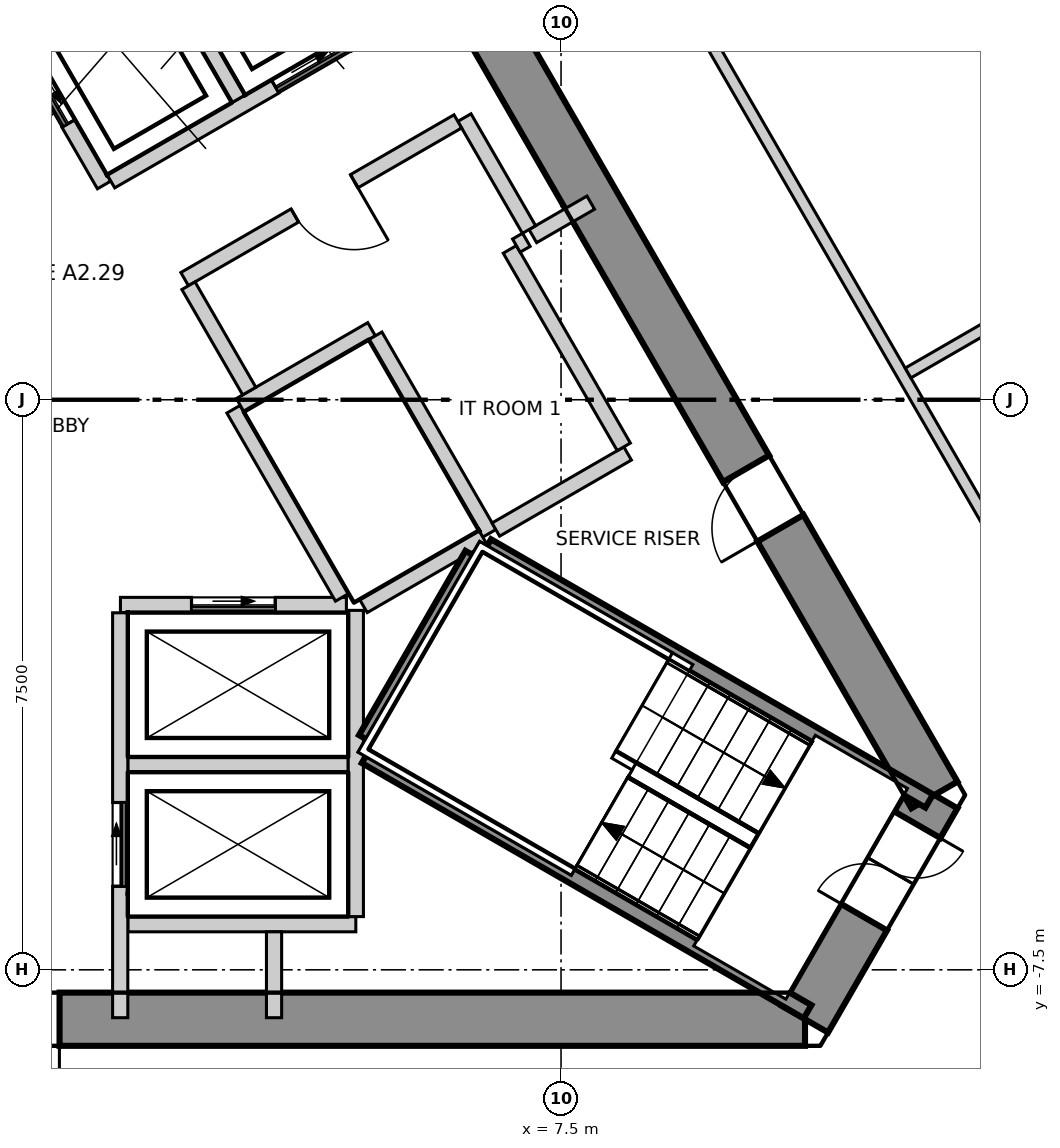
"""IFC4 building model, lengths in metres.
Left out: names, types, materials, properties, quantities, classifications, styles, units other than length and angle.
Written with IfcOpenShell. Run it as: python <this file> out.ifc"""

import sys

from ifc_helpers import new_model, si_unit, direction, frame, frame_2d, origin, place, context, subcontext, project, spatial, polyline, rectangle, outline, extrude, element, fill, save


model = new_model("IFC4")
c1 = context("Model", 3, precision=1e-05, world=origin(), true_north=direction((0.0, 1.0)))
c2 = subcontext(c1, "Body", "Model", "MODEL_VIEW")
j1 = project(units=[si_unit("LENGTHUNIT", "METRE"), si_unit("PLANEANGLEUNIT", "RADIAN")], contexts=[c1])
p1 = place(None, origin())
s1 = spatial("IfcSite", under=j1, at=p1, CompositionType="ELEMENT")
p2 = place(p1, origin())
s2 = spatial("IfcBuilding", under=s1, at=p2, CompositionType="ELEMENT")
p3 = place(p2, frame((0.0, 0.0, 251.3)))
s3 = spatial("IfcBuildingStorey", under=s2, at=p3, CompositionType="ELEMENT", Elevation=251.3)
p4 = place(p3, frame((-10.71, -8.15, -0.3), z_axis=(0.0, 0.0, 1.0), x_axis=(1.0, 0.0, 0.0)))
e1 = element("IfcWall", 1, at=p4, inside=s3, PredefinedType="SHEAR", context=c2, shape_type="SweptSolid", body=[
    extrude(outline(polyline([(-0.202, -0.35), (1.782, -0.35), (3.766, -0.35), (5.75, -0.35), (7.734, -0.35), (9.718, -0.35), (11.702, -0.35), (13.686, -0.35), (15.67, -0.35), (17.654, -0.35), (19.638, -0.35), (21.622, -0.35), (21.218, 0.35), (19.307, 0.35), (17.397, 0.35), (15.486, 0.35), (13.576, 0.35), (11.665, 0.35), (9.755, 0.35), (7.844, 0.35), (5.934, 0.35), (4.023, 0.35), (2.113, 0.35), (0.202, 0.35), (-0.202, -0.35)])), origin(), (0.0, 0.0, 1.0), 4.2),
])
p5 = place(p4, frame((9.81, 0.0, 0.3)))
e2 = element("IfcOpeningElement", 2, at=p5, cuts=e1, PredefinedType="OPENING", context=c2, shape_type="SweptSolid", body=[
    extrude(rectangle(XDim=1.8, YDim=2.1, at=frame_2d((0.9, 1.05))), frame((0.0, 0.36, 0.0), z_axis=(0.0, -1.0, 0.0), x_axis=(1.0, 0.0, 0.0)), (0.0, 0.0, 1.0), 0.72),
])
p6 = place(p4, frame((4.12, 0.0, 0.3)))
e3 = element("IfcOpeningElement", 3, at=p6, cuts=e1, PredefinedType="OPENING", context=c2, shape_type="SweptSolid", body=[
    extrude(rectangle(XDim=0.9, YDim=2.1, at=frame_2d((0.45, 1.05))), frame((0.0, 0.36, 0.0), z_axis=(0.0, -1.0, 0.0), x_axis=(1.0, 0.0, 0.0)), (0.0, 0.0, 1.0), 0.72),
])
p7 = place(p3, frame((10.71, -8.15, -0.3), z_axis=(0.0, 0.0, 1.0), x_axis=(0.49999337185, 0.866029230515, 0.0)))
e4 = element("IfcWall", 4, at=p7, inside=s3, PredefinedType="SHEAR", context=c2, shape_type="SweptSolid", body=[
    extrude(outline(polyline([(-0.202, -0.35), (1.703, -0.35), (3.608, -0.35), (3.204, 0.35), (1.703, 0.35), (0.202, 0.35), (-0.202, -0.35)])), origin(), (0.0, 0.0, 1.0), 4.2),
])
p8 = place(p7, frame((1.553, 0.0, 0.3)))
e5 = element("IfcOpeningElement", 5, at=p8, cuts=e4, PredefinedType="OPENING", context=c2, shape_type="SweptSolid", body=[
    extrude(rectangle(XDim=1.4, YDim=2.1, at=frame_2d((0.7, 1.05))), frame((0.0, 0.36, 0.0), z_axis=(0.0, -1.0, 0.0), x_axis=(1.0, 0.0, 0.0)), (0.0, 0.0, 1.0), 0.72),
])
p9 = place(p3, frame((12.413, -5.2, -0.3), z_axis=(0.0, 0.0, 1.0), x_axis=(-0.500011533395, 0.866018744874, 0.0)))
e6 = element("IfcWall", 6, at=p9, inside=s3, PredefinedType="SHEAR", context=c2, shape_type="SweptSolid", body=[
    extrude(outline(polyline([(-0.202, -0.35), (1.782, -0.35), (3.766, -0.35), (5.75, -0.35), (7.734, -0.35), (9.718, -0.35), (11.702, -0.35), (13.686, -0.35), (15.67, -0.35), (17.654, -0.35), (19.638, -0.35), (21.622, -0.35), (21.218, 0.35), (19.307, 0.35), (17.397, 0.35), (15.486, 0.35), (13.576, 0.35), (11.665, 0.35), (9.755, 0.35), (7.844, 0.35), (5.934, 0.35), (4.023, 0.35), (2.113, 0.35), (0.202, 0.35), (-0.202, -0.35)])), origin(), (0.0, 0.0, 1.0), 4.2),
])
p10 = place(p9, frame((4.055, 0.0, 0.3)))
e7 = element("IfcOpeningElement", 7, at=p10, cuts=e6, PredefinedType="OPENING", context=c2, shape_type="SweptSolid", body=[
    extrude(rectangle(XDim=0.9, YDim=2.1, at=frame_2d((0.45, 1.05))), frame((0.0, 0.36, 0.0), z_axis=(0.0, -1.0, 0.0), x_axis=(1.0, 0.0, 0.0)), (0.0, 0.0, 1.0), 0.72),
])
p11 = place(p9, frame((16.465, 0.0, 0.3)))
e8 = element("IfcOpeningElement", 8, at=p11, cuts=e6, PredefinedType="OPENING", context=c2, shape_type="SweptSolid", body=[
    extrude(rectangle(XDim=0.9, YDim=2.1, at=frame_2d((0.45, 1.05))), frame((0.0, 0.36, 0.0), z_axis=(0.0, -1.0, 0.0), x_axis=(1.0, 0.0, 0.0)), (0.0, 0.0, 1.0), 0.72),
])
p12 = place(p3, frame((26.859, -12.457, 0.0), z_axis=(0.0, 0.0, 1.0), x_axis=(-0.500004868955, 0.866022592674, 0.0)))
e9 = element("IfcWall", 9, at=p12, inside=s3, PredefinedType="ELEMENTEDWALL", context=c2, shape_type="SweptSolid", body=[
    extrude(rectangle(XDim=48.416, YDim=0.2, at=frame_2d((24.208, 0.0))), origin(), (0.0, 0.0, 1.0), 3.9),
])
p13 = place(p12, frame((2.067, 0.0, 0.9)))
e10 = element("IfcOpeningElement", 10, at=p13, cuts=e9, PredefinedType="OPENING", context=c2, shape_type="SweptSolid", body=[
    extrude(rectangle(XDim=4.2, YDim=2.5, at=frame_2d((2.1, 1.25))), frame((0.0, 0.11, 0.0), z_axis=(0.0, -1.0, 0.0), x_axis=(1.0, 0.0, 0.0)), (0.0, 0.0, 1.0), 0.22),
])
p14 = place(p12, frame((7.796, 0.0, 0.9)))
e11 = element("IfcOpeningElement", 11, at=p14, cuts=e9, PredefinedType="OPENING", context=c2, shape_type="SweptSolid", body=[
    extrude(rectangle(XDim=4.2, YDim=2.5, at=frame_2d((2.1, 1.25))), frame((0.0, 0.11, 0.0), z_axis=(0.0, -1.0, 0.0), x_axis=(1.0, 0.0, 0.0)), (0.0, 0.0, 1.0), 0.22),
])
p15 = place(p12, frame((13.525, 0.0, 0.9)))
e12 = element("IfcOpeningElement", 12, at=p15, cuts=e9, PredefinedType="OPENING", context=c2, shape_type="SweptSolid", body=[
    extrude(rectangle(XDim=4.2, YDim=2.5, at=frame_2d((2.1, 1.25))), frame((0.0, 0.11, 0.0), z_axis=(0.0, -1.0, 0.0), x_axis=(1.0, 0.0, 0.0)), (0.0, 0.0, 1.0), 0.22),
])
p16 = place(p12, frame((19.253, 0.0, 0.9)))
e13 = element("IfcOpeningElement", 13, at=p16, cuts=e9, PredefinedType="OPENING", context=c2, shape_type="SweptSolid", body=[
    extrude(rectangle(XDim=4.2, YDim=2.5, at=frame_2d((2.1, 1.25))), frame((0.0, 0.11, 0.0), z_axis=(0.0, -1.0, 0.0), x_axis=(1.0, 0.0, 0.0)), (0.0, 0.0, 1.0), 0.22),
])
p17 = place(p12, frame((24.982, 0.0, 0.9)))
e14 = element("IfcOpeningElement", 14, at=p17, cuts=e9, PredefinedType="OPENING", context=c2, shape_type="SweptSolid", body=[
    extrude(rectangle(XDim=4.2, YDim=2.5, at=frame_2d((2.1, 1.25))), frame((0.0, 0.11, 0.0), z_axis=(0.0, -1.0, 0.0), x_axis=(1.0, 0.0, 0.0)), (0.0, 0.0, 1.0), 0.22),
])
p18 = place(p12, frame((30.711, 0.0, 0.9)))
e15 = element("IfcOpeningElement", 15, at=p18, cuts=e9, PredefinedType="OPENING", context=c2, shape_type="SweptSolid", body=[
    extrude(rectangle(XDim=4.2, YDim=2.5, at=frame_2d((2.1, 1.25))), frame((0.0, 0.11, 0.0), z_axis=(0.0, -1.0, 0.0), x_axis=(1.0, 0.0, 0.0)), (0.0, 0.0, 1.0), 0.22),
])
p19 = place(p12, frame((36.44, 0.0, 0.9)))
e16 = element("IfcOpeningElement", 16, at=p19, cuts=e9, PredefinedType="OPENING", context=c2, shape_type="SweptSolid", body=[
    extrude(rectangle(XDim=4.2, YDim=2.5, at=frame_2d((2.1, 1.25))), frame((0.0, 0.11, 0.0), z_axis=(0.0, -1.0, 0.0), x_axis=(1.0, 0.0, 0.0)), (0.0, 0.0, 1.0), 0.22),
])
p20 = place(p12, frame((42.168, 0.0, 0.9)))
e17 = element("IfcOpeningElement", 17, at=p20, cuts=e9, PredefinedType="OPENING", context=c2, shape_type="SweptSolid", body=[
    extrude(rectangle(XDim=4.2, YDim=2.5, at=frame_2d((2.1, 1.25))), frame((0.0, 0.11, 0.0), z_axis=(0.0, -1.0, 0.0), x_axis=(1.0, 0.0, 0.0)), (0.0, 0.0, 1.0), 0.22),
])
p21 = place(p3, frame((3.132, 15.675, 0.0), z_axis=(0.0, 0.0, 1.0), x_axis=(0.499994246357, -0.866028725626, 0.0)))
e18 = element("IfcWall", 18, at=p21, inside=s3, PredefinedType="PARTITIONING", context=c2, shape_type="SweptSolid", body=[
    extrude(rectangle(XDim=24.104, YDim=0.15, at=frame_2d((12.052, 0.0))), origin(), (0.0, 0.0, 1.0), 3.9),
])
p22 = place(p21, frame((20.321, 0.0, 0.0)))
e19 = element("IfcOpeningElement", 19, at=p22, cuts=e18, PredefinedType="OPENING", context=c2, shape_type="SweptSolid", body=[
    extrude(rectangle(XDim=1.2, YDim=2.1, at=frame_2d((0.6, 1.05))), frame((0.0, 0.085, 0.0), z_axis=(0.0, -1.0, 0.0), x_axis=(1.0, 0.0, 0.0)), (0.0, 0.0, 1.0), 0.17),
])
p23 = place(p21, frame((11.508, 0.0, 0.0)))
e20 = element("IfcOpeningElement", 20, at=p23, cuts=e18, PredefinedType="OPENING", context=c2, shape_type="SweptSolid", body=[
    extrude(rectangle(XDim=1.0, YDim=2.1, at=frame_2d((0.5, 1.05))), frame((0.0, 0.085, 0.0), z_axis=(0.0, -1.0, 0.0), x_axis=(1.0, 0.0, 0.0)), (0.0, 0.0, 1.0), 0.17),
])
p24 = place(p21, frame((2.497, 0.0, 0.0)))
e21 = element("IfcOpeningElement", 21, at=p24, cuts=e18, PredefinedType="OPENING", context=c2, shape_type="SweptSolid", body=[
    extrude(rectangle(XDim=1.2, YDim=2.1, at=frame_2d((0.6, 1.05))), frame((0.0, 0.085, 0.0), z_axis=(0.0, -1.0, 0.0), x_axis=(1.0, 0.0, 0.0)), (0.0, 0.0, 1.0), 0.17),
])
p25 = place(p3, frame((12.066, 0.352, 0.0), z_axis=(0.0, 0.0, 1.0), x_axis=(0.866046605956, 0.499963274963, 0.0)))
e22 = element("IfcWall", 22, at=p25, inside=s3, PredefinedType="PARTITIONING", context=c2, shape_type="SweptSolid", body=[
    extrude(rectangle(XDim=6.406, YDim=0.15, at=frame_2d((3.203, 0.0))), origin(), (0.0, 0.0, 1.0), 3.9),
])
p26 = place(p3, frame((1.8, -4.8, 0.0), z_axis=(0.0, 0.0, 1.0), x_axis=(1.0, 0.0, 0.0)))
e23 = element("IfcWall", 23, at=p26, inside=s3, PredefinedType="SOLIDWALL", context=c2, shape_type="SweptSolid", body=[
    extrude(rectangle(XDim=2.9, YDim=0.2, at=frame_2d((1.45, 0.0))), origin(), (0.0, 0.0, 1.0), 3.9),
])
p27 = place(p3, frame((1.8, -6.9, 0.0), z_axis=(0.0, 0.0, 1.0), x_axis=(1.0, 0.0, 0.0)))
e24 = element("IfcWall", 24, at=p27, inside=s3, PredefinedType="SOLIDWALL", context=c2, shape_type="SweptSolid", body=[
    extrude(rectangle(XDim=3.0, YDim=0.2, at=frame_2d((1.5, 0.0))), origin(), (0.0, 0.0, 1.0), 3.9),
])
p28 = place(p3, frame((1.703, -2.7, 0.0), z_axis=(0.0, 0.0, 1.0), x_axis=(1.0, 0.0, 0.0)))
e25 = element("IfcWall", 25, at=p28, inside=s3, PredefinedType="SOLIDWALL", context=c2, shape_type="SweptSolid", body=[
    extrude(rectangle(XDim=2.973, YDim=0.2, at=frame_2d((1.487, 0.0))), origin(), (0.0, 0.0, 1.0), 3.9),
])
p29 = place(p28, frame((0.936, 0.0, 0.0)))
e26 = element("IfcOpeningElement", 26, at=p29, cuts=e25, PredefinedType="OPENING", context=c2, shape_type="SweptSolid", body=[
    extrude(rectangle(XDim=1.1, YDim=2.1, at=frame_2d((0.55, 1.05))), frame((0.0, 0.11, 0.0), z_axis=(0.0, -1.0, 0.0), x_axis=(1.0, 0.0, 0.0)), (0.0, 0.0, 1.0), 0.22),
])
p30 = place(p3, frame((0.0, 5.4, 0.0), z_axis=(0.0, 0.0, 1.0), x_axis=(0.500103862429, -0.865965430478, 0.0)))
e27 = element("IfcWall", 27, at=p30, inside=s3, PredefinedType="SOLIDWALL", context=c2, shape_type="SweptSolid", body=[
    extrude(rectangle(XDim=2.973, YDim=0.2, at=frame_2d((1.487, 0.0))), origin(), (0.0, 0.0, 1.0), 3.9),
])
p31 = place(p30, frame((0.937, 0.0, 0.0)))
e28 = element("IfcOpeningElement", 28, at=p31, cuts=e27, PredefinedType="OPENING", context=c2, shape_type="SweptSolid", body=[
    extrude(rectangle(XDim=1.1, YDim=2.1, at=frame_2d((0.55, 1.05))), frame((0.0, 0.11, 0.0), z_axis=(0.0, -1.0, 0.0), x_axis=(1.0, 0.0, 0.0)), (0.0, 0.0, 1.0), 0.22),
])
p32 = place(p3, frame((3.19, -0.125, 0.0), z_axis=(0.0, 0.0, 1.0), x_axis=(0.499988658015, -0.866031951983, 0.0)))
e29 = element("IfcWall", 29, at=p32, inside=s3, PredefinedType="SOLIDWALL", context=c2, shape_type="SweptSolid", body=[
    extrude(rectangle(XDim=2.858, YDim=0.2, at=frame_2d((1.429, 0.0))), origin(), (0.0, 0.0, 1.0), 3.9),
])
p33 = place(p3, frame((1.578, 2.874, 0.0), z_axis=(0.0, 0.0, 1.0), x_axis=(0.866045911672, 0.499964477614, 0.0)))
e30 = element("IfcWall", 30, at=p33, inside=s3, PredefinedType="SOLIDWALL", context=c2, shape_type="SweptSolid", body=[
    extrude(rectangle(XDim=5.327, YDim=0.2, at=frame_2d((2.663, 0.0))), origin(), (0.0, 0.0, 1.0), 3.9),
])
p34 = place(p33, frame((2.496, 0.0, 0.0)))
e31 = element("IfcOpeningElement", 31, at=p34, cuts=e30, PredefinedType="OPENING", context=c2, shape_type="SweptSolid", body=[
    extrude(rectangle(XDim=1.1, YDim=2.1, at=frame_2d((0.55, 1.05))), frame((0.0, 0.11, 0.0), z_axis=(0.0, -1.0, 0.0), x_axis=(1.0, 0.0, 0.0)), (0.0, 0.0, 1.0), 0.22),
])
p35 = place(p3, frame((1.7, -8.13, 0.0), z_axis=(0.0, 0.0, 1.0), x_axis=(0.0, 1.0, 0.0)))
e32 = element("IfcWall", 32, at=p35, inside=s3, PredefinedType="SOLIDWALL", context=c2, shape_type="SweptSolid", body=[
    extrude(rectangle(XDim=5.327, YDim=0.2, at=frame_2d((2.664, 0.0))), origin(), (0.0, 0.0, 1.0), 3.9),
])
p36 = place(p35, frame((1.73, 0.0, 0.0)))
e33 = element("IfcOpeningElement", 33, at=p36, cuts=e32, PredefinedType="OPENING", context=c2, shape_type="SweptSolid", body=[
    extrude(rectangle(XDim=1.1, YDim=2.1, at=frame_2d((0.55, 1.05))), frame((0.0, 0.11, 0.0), z_axis=(0.0, -1.0, 0.0), x_axis=(1.0, 0.0, 0.0)), (0.0, 0.0, 1.0), 0.22),
])
p37 = place(p3, frame((4.8, -6.8, 0.0), z_axis=(0.0, 0.0, 1.0), x_axis=(0.0, 1.0, 0.0)))
e34 = element("IfcWall", 34, at=p37, inside=s3, PredefinedType="SOLIDWALL", context=c2, shape_type="SweptSolid", body=[
    extrude(rectangle(XDim=4.029, YDim=0.2, at=frame_2d((2.015, 0.0))), origin(), (0.0, 0.0, 1.0), 3.9),
])
p38 = place(p3, frame((3.278, -0.071, 0.0), z_axis=(0.0, 0.0, 1.0), x_axis=(0.865855657918, 0.500293893279, 0.0)))
e35 = element("IfcWall", 35, at=p38, inside=s3, PredefinedType="SOLIDWALL", context=c2, shape_type="SweptSolid", body=[
    extrude(rectangle(XDim=1.997, YDim=0.2, at=frame_2d((0.999, 0.0))), origin(), (0.0, 0.0, 1.0), 3.9),
])
p39 = place(p3, frame((7.129, 2.153, 0.0), z_axis=(0.0, 0.0, 1.0), x_axis=(0.866083962871, 0.499898558967, 0.0)))
e36 = element("IfcWall", 36, at=p39, inside=s3, PredefinedType="SOLIDWALL", context=c2, shape_type="SweptSolid", body=[
    extrude(rectangle(XDim=0.88, YDim=0.2, at=frame_2d((0.44, 0.0))), origin(), (0.0, 0.0, 1.0), 3.9),
])
p40 = place(p3, frame((1.807, 6.47, 0.0), z_axis=(0.0, 0.0, 1.0), x_axis=(0.50012328804, -0.865954211699, 0.0)))
e37 = element("IfcWall", 37, at=p40, inside=s3, PredefinedType="SOLIDWALL", context=c2, shape_type="SweptSolid", body=[
    extrude(rectangle(XDim=2.9, YDim=0.2, at=frame_2d((1.45, 0.0))), origin(), (0.0, 0.0, 1.0), 3.9),
])
p41 = place(p3, frame((5.057, 0.841, 0.0), z_axis=(0.0, 0.0, 1.0), x_axis=(0.499990139034, -0.866031096941, 0.0)))
e38 = element("IfcWall", 38, at=p41, inside=s3, PredefinedType="SOLIDWALL", context=c2, shape_type="SweptSolid", body=[
    extrude(rectangle(XDim=3.0, YDim=0.2, at=frame_2d((1.5, 0.0))), origin(), (0.0, 0.0, 1.0), 3.9),
])
p42 = place(p3, frame((4.9, -2.714, 0.0), z_axis=(0.0, 0.0, 1.0), x_axis=(0.865846928409, 0.500309001083, 0.0)))
e39 = element("IfcWall", 39, at=p42, inside=s3, PredefinedType="SOLIDWALL", context=c2, shape_type="SweptSolid", body=[
    extrude(rectangle(XDim=1.813, YDim=0.2, at=frame_2d((0.907, 0.0))), origin(), (0.0, 0.0, 1.0), 3.9),
])
p43 = place(p3, frame((6.229, 3.712, 0.0), z_axis=(0.0, 0.0, 1.0), x_axis=(0.499875724984, -0.86609714211, 0.0)))
e40 = element("IfcWall", 40, at=p43, inside=s3, PredefinedType="SOLIDWALL", context=c2, shape_type="SweptSolid", body=[
    extrude(rectangle(XDim=1.701, YDim=0.2, at=frame_2d((0.85, 0.0))), origin(), (0.0, 0.0, 1.0), 3.9),
])
p44 = place(p3, frame((2.548, 1.587, 0.0), z_axis=(0.0, 0.0, 1.0), x_axis=(0.866004344652, 0.500036473714, 0.0)))
e41 = element("IfcWall", 41, at=p44, inside=s3, PredefinedType="SOLIDWALL", context=c2, shape_type="SweptSolid", body=[
    extrude(rectangle(XDim=4.15, YDim=0.2, at=frame_2d((2.075, 0.0))), origin(), (0.0, 0.0, 1.0), 3.9),
])
p45 = place(p44, frame((1.675, 0.0, 0.0)))
e42 = element("IfcOpeningElement", 42, at=p45, cuts=e41, PredefinedType="OPENING", context=c2, shape_type="SweptSolid", body=[
    extrude(rectangle(XDim=0.9, YDim=2.1, at=frame_2d((0.45, 1.05))), frame((0.0, 0.11, 0.0), z_axis=(0.0, -1.0, 0.0), x_axis=(1.0, 0.0, 0.0)), (0.0, 0.0, 1.0), 0.22),
])
p46 = place(p3, frame((2.598, 1.5, 0.0), z_axis=(0.0, 0.0, 1.0), x_axis=(0.499929347863, -0.866066190972, 0.0)))
e43 = element("IfcWall", 43, at=p46, inside=s3, PredefinedType="SOLIDWALL", context=c2, shape_type="SweptSolid", body=[
    extrude(rectangle(XDim=1.6, YDim=0.2, at=frame_2d((0.8, 0.0))), origin(), (0.0, 0.0, 1.0), 3.9),
])
p47 = place(p3, frame((3.724, -8.13, 0.0), z_axis=(0.0, 0.0, 1.0), x_axis=(0.0, 1.0, 0.0)))
e44 = element("IfcWall", 44, at=p47, inside=s3, PredefinedType="SOLIDWALL", context=c2, shape_type="SweptSolid", body=[
    extrude(rectangle(XDim=1.13, YDim=0.2, at=frame_2d((0.565, 0.0))), origin(), (0.0, 0.0, 1.0), 3.9),
])
p48 = place(p3, frame((6.642, -1.708, 0.0), z_axis=(0.0, 0.0, 1.0), x_axis=(0.866043441391, 0.499968756647, 0.0)))
e45 = element("IfcWall", 45, at=p48, inside=s3, PredefinedType="SOLIDWALL", context=c2, shape_type="SweptSolid", body=[
    extrude(rectangle(XDim=2.002, YDim=0.2, at=frame_2d((1.001, 0.0))), origin(), (0.0, 0.0, 1.0), 3.9),
])
p49 = place(p3, frame((6.826, 1.978, 0.0), z_axis=(0.0, 0.0, 1.0), x_axis=(0.499990139034, -0.866031096941, 0.0)))
e46 = element("IfcWall", 46, at=p49, inside=s3, PredefinedType="SOLIDWALL", context=c2, shape_type="SweptSolid", body=[
    extrude(rectangle(XDim=3.0, YDim=0.2, at=frame_2d((1.5, 0.0))), origin(), (0.0, 0.0, 1.0), 3.9),
])
p50 = place(p3, frame((6.912, 2.028, 0.0), z_axis=(0.0, 0.0, 1.0), x_axis=(0.866559367082, 0.499074005857, 0.0)))
e47 = element("IfcWall", 47, at=p50, inside=s3, PredefinedType="SOLIDWALL", context=c2, shape_type="SweptSolid", body=[
    extrude(rectangle(XDim=0.152, YDim=0.2, at=frame_2d((0.076, 0.0))), origin(), (0.0, 0.0, 1.0), 3.9),
])
p51 = place(p3, frame((4.929, -4.693, 0.0), z_axis=(0.0, 0.0, 1.0), x_axis=(0.865983344943, -0.500072840975, 0.0)))
e48 = element("IfcWall", 48, at=p51, inside=s3, PredefinedType="SOLIDWALL", context=c2, shape_type="SweptSolid", body=[
    extrude(rectangle(XDim=6.715, YDim=0.2, at=frame_2d((3.357, 0.0))), origin(), (0.0, 0.0, 1.0), 3.9),
])
p52 = place(p3, frame((4.929, -4.462, 0.0), z_axis=(0.0, 0.0, 1.0), x_axis=(0.500200581029, 0.865909567298, 0.0)))
e49 = element("IfcWall", 49, at=p52, inside=s3, PredefinedType="SOLIDWALL", context=c2, shape_type="SweptSolid", body=[
    extrude(rectangle(XDim=2.799, YDim=0.2, at=frame_2d((1.399, 0.0))), origin(), (0.0, 0.0, 1.0), 3.9),
])
p53 = place(p3, frame((6.529, -1.922, 0.0), z_axis=(0.0, 0.0, 1.0), x_axis=(0.866046323291, -0.499963764601, 0.0)))
e50 = element("IfcWall", 50, at=p53, inside=s3, PredefinedType="SOLIDWALL", context=c2, shape_type="SweptSolid", body=[
    extrude(rectangle(XDim=6.714, YDim=0.2, at=frame_2d((3.357, 0.0))), origin(), (0.0, 0.0, 1.0), 3.9),
])
p54 = place(p29, origin())
e51 = element("IfcDoor", 51, at=p54, inside=s3, OperationType="SLIDING_TO_LEFT", PredefinedType="DOOR", context=c2, shape_type="SweptSolid", body=[
    extrude(rectangle(XDim=1.1, YDim=2.1, at=frame_2d((0.55, 1.05))), frame((0.0, 0.025, 0.0), z_axis=(0.0, -1.0, 0.0), x_axis=(1.0, 0.0, 0.0)), (0.0, 0.0, 1.0), 0.05),
])
fill(e26, e51)
p55 = place(p36, origin())
e52 = element("IfcDoor", 52, at=p55, inside=s3, OperationType="SLIDING_TO_LEFT", PredefinedType="DOOR", context=c2, shape_type="SweptSolid", body=[
    extrude(rectangle(XDim=1.1, YDim=2.1, at=frame_2d((0.55, 1.05))), frame((0.0, 0.025, 0.0), z_axis=(0.0, -1.0, 0.0), x_axis=(1.0, 0.0, 0.0)), (0.0, 0.0, 1.0), 0.05),
])
fill(e33, e52)
p56 = place(p31, origin())
e53 = element("IfcDoor", 53, at=p56, inside=s3, OperationType="SLIDING_TO_LEFT", PredefinedType="DOOR", context=c2, shape_type="SweptSolid", body=[
    extrude(rectangle(XDim=1.1, YDim=2.1, at=frame_2d((0.55, 1.05))), frame((0.0, 0.025, 0.0), z_axis=(0.0, -1.0, 0.0), x_axis=(1.0, 0.0, 0.0)), (0.0, 0.0, 1.0), 0.05),
])
fill(e28, e53)
p57 = place(p34, origin())
e54 = element("IfcDoor", 54, at=p57, inside=s3, OperationType="SLIDING_TO_LEFT", PredefinedType="DOOR", context=c2, shape_type="SweptSolid", body=[
    extrude(rectangle(XDim=1.1, YDim=2.1, at=frame_2d((0.55, 1.05))), frame((0.0, 0.025, 0.0), z_axis=(0.0, -1.0, 0.0), x_axis=(1.0, 0.0, 0.0)), (0.0, 0.0, 1.0), 0.05),
])
fill(e31, e54)
p58 = place(p5, origin())
e55 = element("IfcDoor", 55, at=p58, inside=s3, OperationType="DOUBLE_DOOR_SINGLE_SWING", PredefinedType="DOOR", context=c2, shape_type="SweptSolid", body=[
    extrude(rectangle(XDim=1.8, YDim=2.1, at=frame_2d((0.9, 1.05))), frame((0.0, 0.025, 0.0), z_axis=(0.0, -1.0, 0.0), x_axis=(1.0, 0.0, 0.0)), (0.0, 0.0, 1.0), 0.05),
])
fill(e2, e55)
p59 = place(p8, origin())
e56 = element("IfcDoor", 56, at=p59, inside=s3, OperationType="DOUBLE_DOOR_SINGLE_SWING", PredefinedType="DOOR", context=c2, shape_type="SweptSolid", body=[
    extrude(rectangle(XDim=1.4, YDim=2.1, at=frame_2d((0.7, 1.05))), frame((0.0, 0.025, 0.0), z_axis=(0.0, -1.0, 0.0), x_axis=(1.0, 0.0, 0.0)), (0.0, 0.0, 1.0), 0.05),
])
fill(e5, e56)
p60 = place(p10, origin())
e57 = element("IfcDoor", 57, at=p60, inside=s3, OperationType="SINGLE_SWING_RIGHT", PredefinedType="DOOR", context=c2, shape_type="SweptSolid", body=[
    extrude(rectangle(XDim=0.9, YDim=2.1, at=frame_2d((0.45, 1.05))), frame((0.0, 0.025, 0.0), z_axis=(0.0, -1.0, 0.0), x_axis=(1.0, 0.0, 0.0)), (0.0, 0.0, 1.0), 0.05),
])
fill(e7, e57)
p61 = place(p45, origin())
e58 = element("IfcDoor", 58, at=p61, inside=s3, OperationType="SINGLE_SWING_RIGHT", PredefinedType="DOOR", context=c2, shape_type="SweptSolid", body=[
    extrude(rectangle(XDim=0.9, YDim=2.1, at=frame_2d((0.45, 1.05))), frame((0.0, 0.025, 0.0), z_axis=(0.0, -1.0, 0.0), x_axis=(1.0, 0.0, 0.0)), (0.0, 0.0, 1.0), 0.05),
])
fill(e42, e58)
save(model, sys.argv[1])
